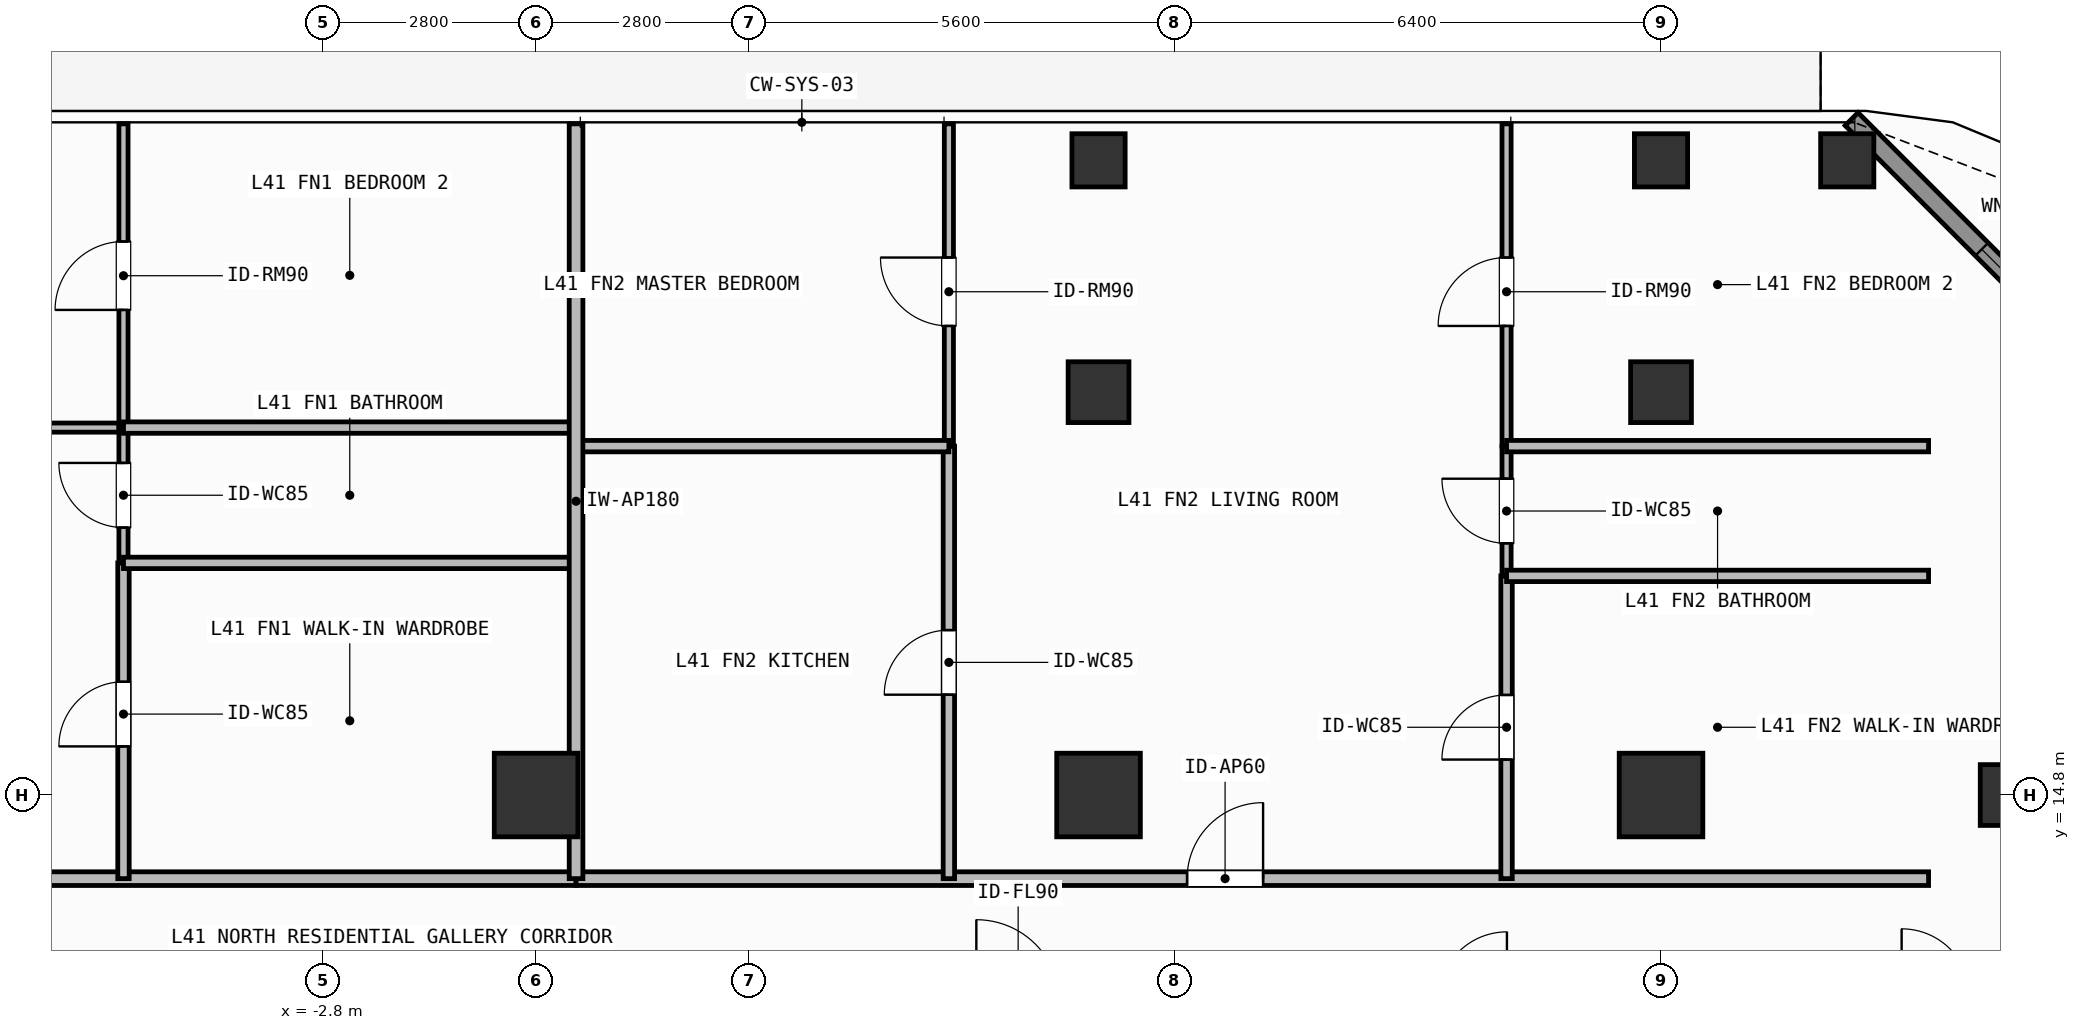
"""IFC4 building model, lengths in metres.
Left out: names, types, materials, properties, quantities, classifications, styles, units other than length and angle.
Written with IfcOpenShell. Run it as: python <this file> out.ifc"""

import sys

from ifc_helpers import new_model, si_unit, direction, frame, frame_2d, origin, origin_2d, place, context, subcontext, project, spatial, rectangle, hollow_rectangle, extrude, element, fill, save


model = new_model("IFC4")
c1 = context("Model", 3, precision=1e-05, world=origin(), true_north=direction((0.0, 1.0)))
c2 = subcontext(c1, "Body", "Model", "MODEL_VIEW")
j1 = project(units=[si_unit("LENGTHUNIT", "METRE"), si_unit("PLANEANGLEUNIT", "RADIAN")], contexts=[c1])
p1 = place(None, origin())
s1 = spatial("IfcSite", under=j1, at=p1, CompositionType="ELEMENT")
p2 = place(p1, origin())
s2 = spatial("IfcBuilding", under=s1, at=p2, CompositionType="ELEMENT")
p3 = place(p2, frame((0.0, 0.0, 168.0)))
s3 = spatial("IfcBuildingStorey", under=s2, at=p3, CompositionType="ELEMENT", Elevation=168.0)
for number, where, z_axis, x_axis in (
    (1, (0.0, 14.8, 0.0), (0.0, 0.0, 1.0), (1.0, 0.0, 0.0)),
    (2, (7.4, 14.8, 0.0), (0.0, 0.0, 1.0), (1.0, 0.0, 0.0)),
    (3, (14.8, 14.8, 0.0), (0.0, 0.0, 1.0), (1.0, 0.0, 0.0)),
):
    element("IfcColumn", number, at=place(p3, frame(where, z_axis=z_axis, x_axis=x_axis)), inside=s3, PredefinedType="COLUMN", context=c2, shape_type="SweptSolid", body=[
        extrude(rectangle(XDim=1.1, YDim=1.1, at=origin_2d()), origin(), (0.0, 0.0, 1.0), 3.9),
    ])
for number, where, z_axis, x_axis in (
    (4, (19.4, 14.8, 0.0), (0.0, 0.0, 1.0), (1.0, 0.0, 0.0)),
    (5, (7.4, 20.1, 0.0), (0.0, 0.0, 1.0), (1.0, 0.0, 0.0)),
    (6, (14.8, 20.1, 0.0), (0.0, 0.0, 1.0), (1.0, 0.0, 0.0)),
):
    element("IfcColumn", number, at=place(p3, frame(where, z_axis=z_axis, x_axis=x_axis)), inside=s3, PredefinedType="COLUMN", context=c2, shape_type="SweptSolid", body=[
        extrude(hollow_rectangle(XDim=0.8, YDim=0.8, WallThickness=0.036, at=origin_2d()), origin(), (0.0, 0.0, 1.0), 3.9),
    ])
for number, where, z_axis, x_axis in (
    (7, (17.25, 23.15, 0.0), (0.0, 0.0, 1.0), (1.0, 0.0, 0.0)),
    (8, (7.4, 23.15, 0.0), (0.0, 0.0, 1.0), (1.0, 0.0, 0.0)),
    (9, (14.8, 23.15, 0.0), (0.0, 0.0, 1.0), (1.0, 0.0, 0.0)),
):
    element("IfcColumn", number, at=place(p3, frame(where, z_axis=z_axis, x_axis=x_axis)), inside=s3, PredefinedType="COLUMN", context=c2, shape_type="SweptSolid", body=[
        extrude(hollow_rectangle(XDim=0.7, YDim=0.7, WallThickness=0.032, at=origin_2d()), origin(), (0.0, 0.0, 1.0), 3.9),
    ])
p4 = place(p3, frame((17.308, 23.692, 0.0), z_axis=(0.0, 0.0, 1.0), x_axis=(0.707106781187, -0.707106781187, 0.0)))
e10 = element("IfcWall", 10, at=p4, inside=s3, PredefinedType="SOLIDWALL", context=c2, shape_type="SweptSolid", body=[
    extrude(rectangle(XDim=6.343, YDim=0.24, at=frame_2d((3.171, 0.0))), origin(), (0.0, 0.0, 1.0), 3.68),
])
p5 = place(p4, frame((2.421, 0.0, 0.8)))
e11 = element("IfcOpeningElement", 11, at=p5, cuts=e10, PredefinedType="OPENING", context=c2, shape_type="SweptSolid", body=[
    extrude(rectangle(XDim=1.5, YDim=1.85, at=frame_2d((0.75, 0.925))), frame((0.0, 0.13, 0.0), z_axis=(0.0, -1.0, 0.0), x_axis=(1.0, 0.0, 0.0)), (0.0, 0.0, 1.0), 0.26),
])
p6 = place(p3, frame((-22.12, 13.7, 0.0), z_axis=(0.0, 0.0, 1.0), x_axis=(1.0, 0.0, 0.0)))
e12 = element("IfcWall", 12, at=p6, inside=s3, PredefinedType="PARTITIONING", context=c2, shape_type="SweptSolid", body=[
    extrude(rectangle(XDim=22.646, YDim=0.18, at=frame_2d((11.323, 0.0))), origin(), (0.0, 0.0, 1.0), 3.68),
])
p7 = place(p6, frame((10.554, 0.0, 0.0)))
e13 = element("IfcOpeningElement", 13, at=p7, cuts=e12, PredefinedType="OPENING", context=c2, shape_type="SweptSolid", body=[
    extrude(rectangle(XDim=1.0, YDim=2.2, at=frame_2d((0.5, 1.1))), frame((0.0, 0.1, 0.0), z_axis=(0.0, -1.0, 0.0), x_axis=(1.0, 0.0, 0.0)), (0.0, 0.0, 1.0), 0.2),
])
p8 = place(p3, frame((-16.726, 19.634, 0.0), z_axis=(0.0, 0.0, 1.0), x_axis=(1.0, 0.0, 0.0)))
e14 = element("IfcWall", 14, at=p8, inside=s3, PredefinedType="PARTITIONING", context=c2, shape_type="SweptSolid", body=[
    extrude(rectangle(XDim=11.298, YDim=0.12, at=frame_2d((5.649, 0.0))), origin(), (0.0, 0.0, 1.0), 3.68),
])
p9 = place(p8, frame((5.199, 0.0, 0.0)))
e15 = element("IfcOpeningElement", 15, at=p9, cuts=e14, PredefinedType="OPENING", context=c2, shape_type="SweptSolid", body=[
    extrude(rectangle(XDim=0.9, YDim=2.1, at=frame_2d((0.45, 1.05))), frame((0.0, 0.07, 0.0), z_axis=(0.0, -1.0, 0.0), x_axis=(1.0, 0.0, 0.0)), (0.0, 0.0, 1.0), 0.14),
])
p10 = place(p3, frame((-5.428, 13.7, 0.0), z_axis=(0.0, 0.0, 1.0), x_axis=(0.0, 1.0, 0.0)))
e16 = element("IfcWall", 16, at=p10, inside=s3, PredefinedType="PARTITIONING", context=c2, shape_type="SweptSolid", body=[
    extrude(rectangle(XDim=4.154, YDim=0.15, at=frame_2d((2.077, 0.0))), origin(), (0.0, 0.0, 1.0), 3.68),
])
p11 = place(p10, frame((1.74, 0.0, 0.0)))
e17 = element("IfcOpeningElement", 17, at=p11, cuts=e16, PredefinedType="OPENING", context=c2, shape_type="SweptSolid", body=[
    extrude(rectangle(XDim=0.85, YDim=2.1, at=frame_2d((0.425, 1.05))), frame((0.0, 0.085, 0.0), z_axis=(0.0, -1.0, 0.0), x_axis=(1.0, 0.0, 0.0)), (0.0, 0.0, 1.0), 0.17),
])
p12 = place(p3, frame((-5.428, 17.854, 0.0), z_axis=(0.0, 0.0, 1.0), x_axis=(0.0, 1.0, 0.0)))
e18 = element("IfcWall", 18, at=p12, inside=s3, PredefinedType="PARTITIONING", context=c2, shape_type="SweptSolid", body=[
    extrude(rectangle(XDim=1.78, YDim=0.12, at=frame_2d((0.89, 0.0))), origin(), (0.0, 0.0, 1.0), 3.68),
])
p13 = place(p12, frame((0.465, 0.0, 0.0)))
e19 = element("IfcOpeningElement", 19, at=p13, cuts=e18, PredefinedType="OPENING", context=c2, shape_type="SweptSolid", body=[
    extrude(rectangle(XDim=0.85, YDim=2.1, at=frame_2d((0.425, 1.05))), frame((0.0, 0.07, 0.0), z_axis=(0.0, -1.0, 0.0), x_axis=(1.0, 0.0, 0.0)), (0.0, 0.0, 1.0), 0.14),
])
p14 = place(p3, frame((-5.428, 19.634, 0.0), z_axis=(0.0, 0.0, 1.0), x_axis=(0.0, 1.0, 0.0)))
e20 = element("IfcWall", 20, at=p14, inside=s3, PredefinedType="PARTITIONING", context=c2, shape_type="SweptSolid", body=[
    extrude(rectangle(XDim=3.996, YDim=0.12, at=frame_2d((1.998, 0.0))), origin(), (0.0, 0.0, 1.0), 3.68),
])
p15 = place(p14, frame((1.548, 0.0, 0.0)))
e21 = element("IfcOpeningElement", 21, at=p15, cuts=e20, PredefinedType="OPENING", context=c2, shape_type="SweptSolid", body=[
    extrude(rectangle(XDim=0.9, YDim=2.1, at=frame_2d((0.45, 1.05))), frame((0.0, 0.07, 0.0), z_axis=(0.0, -1.0, 0.0), x_axis=(1.0, 0.0, 0.0)), (0.0, 0.0, 1.0), 0.14),
])
p16 = place(p3, frame((0.526, 13.7, 0.0), z_axis=(0.0, 0.0, 1.0), x_axis=(1.0, 0.0, 0.0)))
e22 = element("IfcWall", 22, at=p16, inside=s3, PredefinedType="PARTITIONING", context=c2, shape_type="SweptSolid", body=[
    extrude(rectangle(XDim=17.794, YDim=0.18, at=frame_2d((8.897, 0.0))), origin(), (0.0, 0.0, 1.0), 3.68),
])
p17 = place(p16, frame((8.039, 0.0, 0.0)))
e23 = element("IfcOpeningElement", 23, at=p17, cuts=e22, PredefinedType="OPENING", context=c2, shape_type="SweptSolid", body=[
    extrude(rectangle(XDim=1.0, YDim=2.2, at=frame_2d((0.5, 1.1))), frame((0.0, 0.1, 0.0), z_axis=(0.0, -1.0, 0.0), x_axis=(1.0, 0.0, 0.0)), (0.0, 0.0, 1.0), 0.2),
])
p18 = place(p3, frame((5.431, 13.7, 0.0), z_axis=(0.0, 0.0, 1.0), x_axis=(0.0, 1.0, 0.0)))
e24 = element("IfcWall", 24, at=p18, inside=s3, PredefinedType="PARTITIONING", context=c2, shape_type="SweptSolid", body=[
    extrude(rectangle(XDim=5.69, YDim=0.15, at=frame_2d((2.845, 0.0))), origin(), (0.0, 0.0, 1.0), 3.68),
])
p19 = place(p18, frame((2.42, 0.0, 0.0)))
e25 = element("IfcOpeningElement", 25, at=p19, cuts=e24, PredefinedType="OPENING", context=c2, shape_type="SweptSolid", body=[
    extrude(rectangle(XDim=0.85, YDim=2.1, at=frame_2d((0.425, 1.05))), frame((0.0, 0.085, 0.0), z_axis=(0.0, -1.0, 0.0), x_axis=(1.0, 0.0, 0.0)), (0.0, 0.0, 1.0), 0.17),
])
p20 = place(p3, frame((5.431, 19.39, 0.0), z_axis=(0.0, 0.0, 1.0), x_axis=(0.0, 1.0, 0.0)))
e26 = element("IfcWall", 26, at=p20, inside=s3, PredefinedType="PARTITIONING", context=c2, shape_type="SweptSolid", body=[
    extrude(rectangle(XDim=4.24, YDim=0.12, at=frame_2d((2.12, 0.0))), origin(), (0.0, 0.0, 1.0), 3.68),
])
p21 = place(p20, frame((1.581, 0.0, 0.0)))
e27 = element("IfcOpeningElement", 27, at=p21, cuts=e26, PredefinedType="OPENING", context=c2, shape_type="SweptSolid", body=[
    extrude(rectangle(XDim=0.9, YDim=2.1, at=frame_2d((0.45, 1.05))), frame((0.0, 0.07, 0.0), z_axis=(0.0, -1.0, 0.0), x_axis=(1.0, 0.0, 0.0)), (0.0, 0.0, 1.0), 0.14),
])
p22 = place(p3, frame((12.768, 13.7, 0.0), z_axis=(0.0, 0.0, 1.0), x_axis=(0.0, 1.0, 0.0)))
e28 = element("IfcWall", 28, at=p22, inside=s3, PredefinedType="PARTITIONING", context=c2, shape_type="SweptSolid", body=[
    extrude(rectangle(XDim=3.983, YDim=0.15, at=frame_2d((1.992, 0.0))), origin(), (0.0, 0.0, 1.0), 3.68),
])
p23 = place(p22, frame((1.566, 0.0, 0.0)))
e29 = element("IfcOpeningElement", 29, at=p23, cuts=e28, PredefinedType="OPENING", context=c2, shape_type="SweptSolid", body=[
    extrude(rectangle(XDim=0.85, YDim=2.1, at=frame_2d((0.425, 1.05))), frame((0.0, 0.085, 0.0), z_axis=(0.0, -1.0, 0.0), x_axis=(1.0, 0.0, 0.0)), (0.0, 0.0, 1.0), 0.17),
])
p24 = place(p3, frame((12.768, 17.683, 0.0), z_axis=(0.0, 0.0, 1.0), x_axis=(0.0, 1.0, 0.0)))
e30 = element("IfcWall", 30, at=p24, inside=s3, PredefinedType="PARTITIONING", context=c2, shape_type="SweptSolid", body=[
    extrude(rectangle(XDim=1.707, YDim=0.12, at=frame_2d((0.854, 0.0))), origin(), (0.0, 0.0, 1.0), 3.68),
])
p25 = place(p24, frame((0.428, 0.0, 0.0)))
e31 = element("IfcOpeningElement", 31, at=p25, cuts=e30, PredefinedType="OPENING", context=c2, shape_type="SweptSolid", body=[
    extrude(rectangle(XDim=0.85, YDim=2.1, at=frame_2d((0.425, 1.05))), frame((0.0, 0.07, 0.0), z_axis=(0.0, -1.0, 0.0), x_axis=(1.0, 0.0, 0.0)), (0.0, 0.0, 1.0), 0.14),
])
p26 = place(p3, frame((12.768, 19.39, 0.0), z_axis=(0.0, 0.0, 1.0), x_axis=(0.0, 1.0, 0.0)))
e32 = element("IfcWall", 32, at=p26, inside=s3, PredefinedType="PARTITIONING", context=c2, shape_type="SweptSolid", body=[
    extrude(rectangle(XDim=4.24, YDim=0.12, at=frame_2d((2.12, 0.0))), origin(), (0.0, 0.0, 1.0), 3.68),
])
p27 = place(p26, frame((1.581, 0.0, 0.0)))
e33 = element("IfcOpeningElement", 33, at=p27, cuts=e32, PredefinedType="OPENING", context=c2, shape_type="SweptSolid", body=[
    extrude(rectangle(XDim=0.9, YDim=2.1, at=frame_2d((0.45, 1.05))), frame((0.0, 0.07, 0.0), z_axis=(0.0, -1.0, 0.0), x_axis=(1.0, 0.0, 0.0)), (0.0, 0.0, 1.0), 0.14),
])
for number, where, z_axis, x_axis in (
    (34, (-5.428, 17.854, 0.0), (0.0, 0.0, 1.0), (1.0, 0.0, 0.0)),
    (35, (-5.428, 19.634, 0.0), (0.0, 0.0, 1.0), (1.0, 0.0, 0.0)),
):
    element("IfcWall", number, at=place(p3, frame(where, z_axis=z_axis, x_axis=x_axis)), inside=s3, PredefinedType="PARTITIONING", context=c2, shape_type="SweptSolid", body=[
        extrude(rectangle(XDim=5.954, YDim=0.15, at=frame_2d((2.977, 0.0))), origin(), (0.0, 0.0, 1.0), 3.68),
    ])
p28 = place(p3, frame((0.526, 19.39, 0.0), z_axis=(0.0, 0.0, 1.0), x_axis=(1.0, 0.0, 0.0)))
e36 = element("IfcWall", 36, at=p28, inside=s3, PredefinedType="PARTITIONING", context=c2, shape_type="SweptSolid", body=[
    extrude(rectangle(XDim=4.905, YDim=0.15, at=frame_2d((2.453, 0.0))), origin(), (0.0, 0.0, 1.0), 3.68),
])
for number, where, z_axis, x_axis in (
    (37, (12.768, 17.683, 0.0), (0.0, 0.0, 1.0), (1.0, 0.0, 0.0)),
    (38, (12.768, 19.39, 0.0), (0.0, 0.0, 1.0), (1.0, 0.0, 0.0)),
):
    element("IfcWall", number, at=place(p3, frame(where, z_axis=z_axis, x_axis=x_axis)), inside=s3, PredefinedType="PARTITIONING", context=c2, shape_type="SweptSolid", body=[
        extrude(rectangle(XDim=5.552, YDim=0.15, at=frame_2d((2.776, 0.0))), origin(), (0.0, 0.0, 1.0), 3.68),
    ])
p29 = place(p3, frame((0.526, 13.7, 0.0), z_axis=(0.0, 0.0, 1.0), x_axis=(0.0, 1.0, 0.0)))
e39 = element("IfcWall", 39, at=p29, inside=s3, PredefinedType="PARTITIONING", context=c2, shape_type="SweptSolid", body=[
    extrude(rectangle(XDim=9.93, YDim=0.18, at=frame_2d((4.965, 0.0))), origin(), (0.0, 0.0, 1.0), 3.68),
])
p30 = place(p5, origin())
e40 = element("IfcWindow", 40, at=p30, inside=s3, PartitioningType="SINGLE_PANEL", PredefinedType="WINDOW", context=c2, shape_type="SweptSolid", body=[
    extrude(rectangle(XDim=1.5, YDim=1.85, at=frame_2d((0.75, 0.925))), frame((0.0, 0.03, 0.0), z_axis=(0.0, -1.0, 0.0), x_axis=(1.0, 0.0, 0.0)), (0.0, 0.0, 1.0), 0.06),
])
fill(e11, e40)
p31 = place(p11, origin())
e41 = element("IfcDoor", 41, at=p31, inside=s3, OperationType="SINGLE_SWING_LEFT", PredefinedType="DOOR", context=c2, shape_type="SweptSolid", body=[
    extrude(rectangle(XDim=0.85, YDim=2.1, at=frame_2d((0.425, 1.05))), frame((0.0, 0.025, 0.0), z_axis=(0.0, -1.0, 0.0), x_axis=(1.0, 0.0, 0.0)), (0.0, 0.0, 1.0), 0.05),
])
fill(e17, e41)
p32 = place(p13, origin())
e42 = element("IfcDoor", 42, at=p32, inside=s3, OperationType="SINGLE_SWING_RIGHT", PredefinedType="DOOR", context=c2, shape_type="SweptSolid", body=[
    extrude(rectangle(XDim=0.85, YDim=2.1, at=frame_2d((0.425, 1.05))), frame((0.0, 0.025, 0.0), z_axis=(0.0, -1.0, 0.0), x_axis=(1.0, 0.0, 0.0)), (0.0, 0.0, 1.0), 0.05),
])
fill(e19, e42)
p33 = place(p15, origin())
e43 = element("IfcDoor", 43, at=p33, inside=s3, OperationType="SINGLE_SWING_LEFT", PredefinedType="DOOR", context=c2, shape_type="SweptSolid", body=[
    extrude(rectangle(XDim=0.9, YDim=2.1, at=frame_2d((0.45, 1.05))), frame((0.0, 0.025, 0.0), z_axis=(0.0, -1.0, 0.0), x_axis=(1.0, 0.0, 0.0)), (0.0, 0.0, 1.0), 0.05),
])
fill(e21, e43)
p34 = place(p17, origin())
e44 = element("IfcDoor", 44, at=p34, inside=s3, OperationType="SINGLE_SWING_RIGHT", PredefinedType="DOOR", context=c2, shape_type="SweptSolid", body=[
    extrude(rectangle(XDim=1.0, YDim=2.2, at=frame_2d((0.5, 1.1))), frame((0.0, 0.025, 0.0), z_axis=(0.0, -1.0, 0.0), x_axis=(1.0, 0.0, 0.0)), (0.0, 0.0, 1.0), 0.05),
])
fill(e23, e44)
p35 = place(p19, origin())
e45 = element("IfcDoor", 45, at=p35, inside=s3, OperationType="SINGLE_SWING_LEFT", PredefinedType="DOOR", context=c2, shape_type="SweptSolid", body=[
    extrude(rectangle(XDim=0.85, YDim=2.1, at=frame_2d((0.425, 1.05))), frame((0.0, 0.025, 0.0), z_axis=(0.0, -1.0, 0.0), x_axis=(1.0, 0.0, 0.0)), (0.0, 0.0, 1.0), 0.05),
])
fill(e25, e45)
p36 = place(p21, origin())
e46 = element("IfcDoor", 46, at=p36, inside=s3, OperationType="SINGLE_SWING_RIGHT", PredefinedType="DOOR", context=c2, shape_type="SweptSolid", body=[
    extrude(rectangle(XDim=0.9, YDim=2.1, at=frame_2d((0.45, 1.05))), frame((0.0, 0.025, 0.0), z_axis=(0.0, -1.0, 0.0), x_axis=(1.0, 0.0, 0.0)), (0.0, 0.0, 1.0), 0.05),
])
fill(e27, e46)
p37 = place(p23, origin())
e47 = element("IfcDoor", 47, at=p37, inside=s3, OperationType="SINGLE_SWING_LEFT", PredefinedType="DOOR", context=c2, shape_type="SweptSolid", body=[
    extrude(rectangle(XDim=0.85, YDim=2.1, at=frame_2d((0.425, 1.05))), frame((0.0, 0.025, 0.0), z_axis=(0.0, -1.0, 0.0), x_axis=(1.0, 0.0, 0.0)), (0.0, 0.0, 1.0), 0.05),
])
fill(e29, e47)
p38 = place(p25, origin())
e48 = element("IfcDoor", 48, at=p38, inside=s3, OperationType="SINGLE_SWING_RIGHT", PredefinedType="DOOR", context=c2, shape_type="SweptSolid", body=[
    extrude(rectangle(XDim=0.85, YDim=2.1, at=frame_2d((0.425, 1.05))), frame((0.0, 0.025, 0.0), z_axis=(0.0, -1.0, 0.0), x_axis=(1.0, 0.0, 0.0)), (0.0, 0.0, 1.0), 0.05),
])
fill(e31, e48)
p39 = place(p27, origin())
e49 = element("IfcDoor", 49, at=p39, inside=s3, OperationType="SINGLE_SWING_LEFT", PredefinedType="DOOR", context=c2, shape_type="SweptSolid", body=[
    extrude(rectangle(XDim=0.9, YDim=2.1, at=frame_2d((0.45, 1.05))), frame((0.0, 0.025, 0.0), z_axis=(0.0, -1.0, 0.0), x_axis=(1.0, 0.0, 0.0)), (0.0, 0.0, 1.0), 0.05),
])
fill(e33, e49)
save(model, sys.argv[1])
